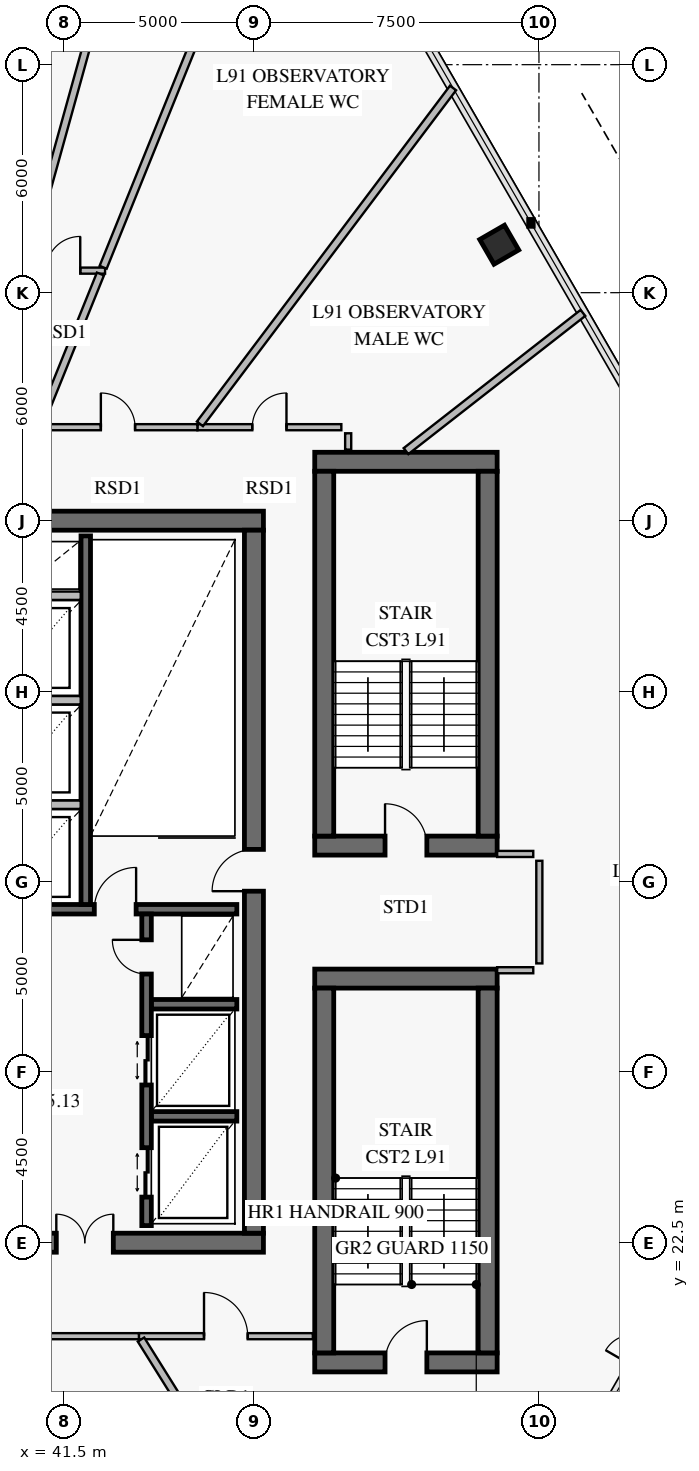
"""IFC4 building model, lengths in metres.
Left out: names, types, materials, properties, quantities, classifications, styles, units other than length and angle.
Written with IfcOpenShell. Run it as: python <this file> out.ifc"""

import sys

from ifc_helpers import new_model, si_unit, direction, frame, frame_2d, origin, origin_2d, place, context, subcontext, project, spatial, rectangle, extrude, element, fill, save


model = new_model("IFC4")
c1 = context("Model", 3, precision=1e-05, world=origin(), true_north=direction((0.0, 1.0)))
c2 = subcontext(c1, "Body", "Model", "MODEL_VIEW")
j1 = project(units=[si_unit("LENGTHUNIT", "METRE"), si_unit("PLANEANGLEUNIT", "RADIAN")], contexts=[c1])
p1 = place(None, origin())
s1 = spatial("IfcSite", under=j1, at=p1, CompositionType="ELEMENT")
p2 = place(p1, origin())
s2 = spatial("IfcBuilding", under=s1, at=p2, CompositionType="ELEMENT")
p3 = place(p2, frame((0.0, 0.0, 357.6)))
s3 = spatial("IfcBuildingStorey", under=s2, at=p3, CompositionType="ELEMENT", Elevation=357.6)
p4 = place(p3, frame((37.35, 22.5, 0.0), z_axis=(0.0, 0.0, 1.0), x_axis=(1.0, 0.0, 0.0)))
e1 = element("IfcWall", 1, at=p4, inside=s3, PredefinedType="SHEAR", context=c2, shape_type="SweptSolid", body=[
    extrude(rectangle(XDim=9.4, YDim=0.5, at=frame_2d((4.7, 0.0))), origin(), (0.0, 0.0, 1.0), 3.8),
])
p5 = place(p4, frame((3.95, 0.0, 0.0)))
e2 = element("IfcOpeningElement", 2, at=p5, cuts=e1, PredefinedType="OPENING", context=c2, shape_type="SweptSolid", body=[
    extrude(rectangle(XDim=1.5, YDim=2.15, at=frame_2d((0.75, 1.075))), frame((0.0, 0.262, 0.0), z_axis=(0.0, -1.0, 0.0), x_axis=(1.0, 0.0, 0.0)), (0.0, 0.0, 1.0), 0.524),
])
p6 = place(p3, frame((46.75, 41.5, 0.0), z_axis=(0.0, 0.0, 1.0), x_axis=(-1.0, 0.0, 0.0)))
e3 = element("IfcWall", 3, at=p6, inside=s3, PredefinedType="SHEAR", context=c2, shape_type="SweptSolid", body=[
    extrude(rectangle(XDim=7.8, YDim=0.5, at=frame_2d((3.9, 0.0))), origin(), (0.0, 0.0, 1.0), 3.8),
])
p7 = place(p3, frame((46.5, 22.75, 0.0), z_axis=(0.0, 0.0, 1.0), x_axis=(0.0, 1.0, 0.0)))
e4 = element("IfcWall", 4, at=p7, inside=s3, PredefinedType="SHEAR", context=c2, shape_type="SweptSolid", body=[
    extrude(rectangle(XDim=18.5, YDim=0.5, at=frame_2d((9.25, 0.0))), origin(), (0.0, 0.0, 1.0), 3.8),
])
p8 = place(p7, frame((9.0, 0.0, 0.0)))
e5 = element("IfcOpeningElement", 5, at=p8, cuts=e4, PredefinedType="OPENING", context=c2, shape_type="SweptSolid", body=[
    extrude(rectangle(XDim=1.1, YDim=2.15, at=frame_2d((0.55, 1.075))), frame((0.0, 0.262, 0.0), z_axis=(0.0, -1.0, 0.0), x_axis=(1.0, 0.0, 0.0)), (0.0, 0.0, 1.0), 0.524),
])
p9 = place(p3, frame((52.955, 48.762, 0.0), z_axis=(0.0, 0.0, 1.0), x_axis=(-0.5, 0.866025403784, 0.0)))
e6 = element("IfcColumn", 6, at=p9, inside=s3, PredefinedType="COLUMN", context=c2, shape_type="SweptSolid", body=[
    extrude(rectangle(XDim=0.75, YDim=0.75, at=origin_2d()), origin(), (0.0, 0.0, 1.0), 3.35),
])
p10 = place(p3, frame((48.1, 19.35, 0.0), z_axis=(0.0, 0.0, 1.0), x_axis=(1.0, 0.0, 0.0)))
e7 = element("IfcWall", 7, at=p10, inside=s3, PredefinedType="SHEAR", context=c2, shape_type="SweptSolid", body=[
    extrude(rectangle(XDim=4.8, YDim=0.5, at=frame_2d((2.4, 0.0))), origin(), (0.0, 0.0, 1.0), 3.8),
])
p11 = place(p10, frame((1.85, 0.0, 0.0)))
e8 = element("IfcOpeningElement", 8, at=p11, cuts=e7, PredefinedType="OPENING", context=c2, shape_type="SweptSolid", body=[
    extrude(rectangle(XDim=1.1, YDim=2.15, at=frame_2d((0.55, 1.075))), frame((0.0, 0.262, 0.0), z_axis=(0.0, -1.0, 0.0), x_axis=(1.0, 0.0, 0.0)), (0.0, 0.0, 1.0), 0.524),
])
p12 = place(p3, frame((52.9, 29.45, 0.0), z_axis=(0.0, 0.0, 1.0), x_axis=(-1.0, 0.0, 0.0)))
e9 = element("IfcWall", 9, at=p12, inside=s3, PredefinedType="SHEAR", context=c2, shape_type="SweptSolid", body=[
    extrude(rectangle(XDim=4.8, YDim=0.5, at=frame_2d((2.4, 0.0))), origin(), (0.0, 0.0, 1.0), 3.8),
])
for number, where, z_axis, x_axis in (
    (10, (48.35, 19.6, 0.0), (0.0, 0.0, 1.0), (0.0, 1.0, 0.0)),
    (11, (52.65, 29.2, 0.0), (0.0, 0.0, 1.0), (0.0, -1.0, 0.0)),
):
    element("IfcWall", number, at=place(p3, frame(where, z_axis=z_axis, x_axis=x_axis)), inside=s3, PredefinedType="SHEAR", context=c2, shape_type="SweptSolid", body=[
        extrude(rectangle(XDim=9.6, YDim=0.5, at=frame_2d((4.8, 0.0))), origin(), (0.0, 0.0, 1.0), 3.8),
    ])
p13 = place(p3, frame((48.1, 32.95, 0.0), z_axis=(0.0, 0.0, 1.0), x_axis=(1.0, 0.0, 0.0)))
e12 = element("IfcWall", 12, at=p13, inside=s3, PredefinedType="SHEAR", context=c2, shape_type="SweptSolid", body=[
    extrude(rectangle(XDim=4.8, YDim=0.5, at=frame_2d((2.4, 0.0))), origin(), (0.0, 0.0, 1.0), 3.8),
])
p14 = place(p13, frame((1.85, 0.0, 0.0)))
e13 = element("IfcOpeningElement", 13, at=p14, cuts=e12, PredefinedType="OPENING", context=c2, shape_type="SweptSolid", body=[
    extrude(rectangle(XDim=1.1, YDim=2.15, at=frame_2d((0.55, 1.075))), frame((0.0, 0.262, 0.0), z_axis=(0.0, -1.0, 0.0), x_axis=(1.0, 0.0, 0.0)), (0.0, 0.0, 1.0), 0.524),
])
p15 = place(p3, frame((52.9, 43.05, 0.0), z_axis=(0.0, 0.0, 1.0), x_axis=(-1.0, 0.0, 0.0)))
e14 = element("IfcWall", 14, at=p15, inside=s3, PredefinedType="SHEAR", context=c2, shape_type="SweptSolid", body=[
    extrude(rectangle(XDim=4.8, YDim=0.5, at=frame_2d((2.4, 0.0))), origin(), (0.0, 0.0, 1.0), 3.8),
])
for number, where, z_axis, x_axis in (
    (15, (48.35, 33.2, 0.0), (0.0, 0.0, 1.0), (0.0, 1.0, 0.0)),
    (16, (52.65, 42.8, 0.0), (0.0, 0.0, 1.0), (0.0, -1.0, 0.0)),
):
    element("IfcWall", number, at=place(p3, frame(where, z_axis=z_axis, x_axis=x_axis)), inside=s3, PredefinedType="SHEAR", context=c2, shape_type="SweptSolid", body=[
        extrude(rectangle(XDim=9.6, YDim=0.5, at=frame_2d((4.8, 0.0))), origin(), (0.0, 0.0, 1.0), 3.8),
    ])
p16 = place(p3, frame((25.95, 31.275, 0.0), z_axis=(0.0, 0.0, 1.0), x_axis=(1.0, 0.0, 0.0)))
e17 = element("IfcWall", 17, at=p16, inside=s3, PredefinedType="SOLIDWALL", context=c2, shape_type="SweptSolid", body=[
    extrude(rectangle(XDim=20.1, YDim=0.25, at=frame_2d((10.05, 0.0))), origin(), (0.0, 0.0, 1.0), 3.8),
])
p17 = place(p16, frame((2.6, 0.0, 0.0)))
e18 = element("IfcOpeningElement", 18, at=p17, cuts=e17, PredefinedType="OPENING", context=c2, shape_type="SweptSolid", body=[
    extrude(rectangle(XDim=1.1, YDim=2.15, at=frame_2d((0.55, 1.075))), frame((0.0, 0.137, 0.0), z_axis=(0.0, -1.0, 0.0), x_axis=(1.0, 0.0, 0.0)), (0.0, 0.0, 1.0), 0.274),
])
p18 = place(p16, frame((10.6, 0.0, 0.0)))
e19 = element("IfcOpeningElement", 19, at=p18, cuts=e17, PredefinedType="OPENING", context=c2, shape_type="SweptSolid", body=[
    extrude(rectangle(XDim=1.1, YDim=2.15, at=frame_2d((0.55, 1.075))), frame((0.0, 0.137, 0.0), z_axis=(0.0, -1.0, 0.0), x_axis=(1.0, 0.0, 0.0)), (0.0, 0.0, 1.0), 0.274),
])
p19 = place(p16, frame((16.35, 0.0, 0.0)))
e20 = element("IfcOpeningElement", 20, at=p19, cuts=e17, PredefinedType="OPENING", context=c2, shape_type="SweptSolid", body=[
    extrude(rectangle(XDim=1.1, YDim=2.15, at=frame_2d((0.55, 1.075))), frame((0.0, 0.137, 0.0), z_axis=(0.0, -1.0, 0.0), x_axis=(1.0, 0.0, 0.0)), (0.0, 0.0, 1.0), 0.274),
])
p20 = place(p3, frame((42.075, 31.4, 0.0), z_axis=(0.0, 0.0, 1.0), x_axis=(0.0, 1.0, 0.0)))
e21 = element("IfcWall", 21, at=p20, inside=s3, PredefinedType="SOLIDWALL", context=c2, shape_type="SweptSolid", body=[
    extrude(rectangle(XDim=9.7, YDim=0.25, at=frame_2d((4.85, 0.0))), origin(), (0.0, 0.0, 1.0), 3.8),
])
for number, where, z_axis, x_axis in (
    (22, (43.8, 25.825, 0.0), (0.0, 0.0, 1.0), (1.0, 0.0, 0.0)),
    (23, (43.8, 28.775, 0.0), (0.0, 0.0, 1.0), (1.0, 0.0, 0.0)),
):
    element("IfcWall", number, at=place(p3, frame(where, z_axis=z_axis, x_axis=x_axis)), inside=s3, PredefinedType="SOLIDWALL", context=c2, shape_type="SweptSolid", body=[
        extrude(rectangle(XDim=2.25, YDim=0.25, at=frame_2d((1.125, 0.0))), origin(), (0.0, 0.0, 1.0), 3.8),
    ])
p21 = place(p3, frame((43.675, 22.95, 0.0), z_axis=(0.0, 0.0, 1.0), x_axis=(0.0, 1.0, 0.0)))
e24 = element("IfcWall", 24, at=p21, inside=s3, PredefinedType="SOLIDWALL", context=c2, shape_type="SweptSolid", body=[
    extrude(rectangle(XDim=8.2, YDim=0.25, at=frame_2d((4.1, 0.0))), origin(), (0.0, 0.0, 1.0), 3.8),
])
p22 = place(p21, frame((0.75, 0.0, 0.0)))
e25 = element("IfcOpeningElement", 25, at=p22, cuts=e24, PredefinedType="OPENING", context=c2, shape_type="SweptSolid", body=[
    extrude(rectangle(XDim=1.3, YDim=2.3, at=frame_2d((0.65, 1.15))), frame((0.0, 0.137, 0.0), z_axis=(0.0, -1.0, 0.0), x_axis=(1.0, 0.0, 0.0)), (0.0, 0.0, 1.0), 0.274),
])
p23 = place(p21, frame((3.7, 0.0, 0.0)))
e26 = element("IfcOpeningElement", 26, at=p23, cuts=e24, PredefinedType="OPENING", context=c2, shape_type="SweptSolid", body=[
    extrude(rectangle(XDim=1.3, YDim=2.3, at=frame_2d((0.65, 1.15))), frame((0.0, 0.137, 0.0), z_axis=(0.0, -1.0, 0.0), x_axis=(1.0, 0.0, 0.0)), (0.0, 0.0, 1.0), 0.274),
])
p24 = place(p21, frame((6.62, 0.0, 0.0)))
e27 = element("IfcOpeningElement", 27, at=p24, cuts=e24, PredefinedType="OPENING", context=c2, shape_type="SweptSolid", body=[
    extrude(rectangle(XDim=0.9, YDim=2.1, at=frame_2d((0.45, 1.05))), frame((0.0, 0.137, 0.0), z_axis=(0.0, -1.0, 0.0), x_axis=(1.0, 0.0, 0.0)), (0.0, 0.0, 1.0), 0.274),
])
p25 = place(p3, frame((43.473, 20.04, 0.0), z_axis=(0.0, 0.0, 1.0), x_axis=(1.0, 0.0, 0.0)))
e28 = element("IfcWall", 28, at=p25, inside=s3, PredefinedType="PARTITIONING", context=c2, shape_type="SweptSolid", body=[
    extrude(rectangle(XDim=4.577, YDim=0.16, at=frame_2d((2.288, 0.0))), origin(), (0.0, 0.0, 1.0), 3.35),
])
p26 = place(p25, frame((1.713, 0.0, 0.0)))
e29 = element("IfcOpeningElement", 29, at=p26, cuts=e28, PredefinedType="OPENING", context=c2, shape_type="SweptSolid", body=[
    extrude(rectangle(XDim=1.15, YDim=2.2, at=frame_2d((0.575, 1.1))), frame((0.0, 0.092, 0.0), z_axis=(0.0, -1.0, 0.0), x_axis=(1.0, 0.0, 0.0)), (0.0, 0.0, 1.0), 0.184),
])
p27 = place(p3, frame((48.8, 43.96, 0.0), z_axis=(0.0, 0.0, 1.0), x_axis=(-1.0, 0.0, 0.0)))
e30 = element("IfcWall", 30, at=p27, inside=s3, PredefinedType="PARTITIONING", context=c2, shape_type="SweptSolid", body=[
    extrude(rectangle(XDim=3.788, YDim=0.16, at=frame_2d((1.894, 0.0))), origin(), (0.0, 0.0, 1.0), 3.35),
])
p28 = place(p27, frame((1.444, 0.0, 0.0)))
e31 = element("IfcOpeningElement", 31, at=p28, cuts=e30, PredefinedType="OPENING", context=c2, shape_type="SweptSolid", body=[
    extrude(rectangle(XDim=0.9, YDim=2.1, at=frame_2d((0.45, 1.05))), frame((0.0, 0.092, 0.0), z_axis=(0.0, -1.0, 0.0), x_axis=(1.0, 0.0, 0.0)), (0.0, 0.0, 1.0), 0.184),
])
p29 = place(p3, frame((45.012, 43.96, 0.0), z_axis=(0.0, 0.0, 1.0), x_axis=(-1.0, 0.0, 0.0)))
e32 = element("IfcWall", 32, at=p29, inside=s3, PredefinedType="PARTITIONING", context=c2, shape_type="SweptSolid", body=[
    extrude(rectangle(XDim=4.18, YDim=0.16, at=frame_2d((2.09, 0.0))), origin(), (0.0, 0.0, 1.0), 3.35),
])
p30 = place(p29, frame((1.64, 0.0, 0.0)))
e33 = element("IfcOpeningElement", 33, at=p30, cuts=e32, PredefinedType="OPENING", context=c2, shape_type="SweptSolid", body=[
    extrude(rectangle(XDim=0.9, YDim=2.1, at=frame_2d((0.45, 1.05))), frame((0.0, 0.092, 0.0), z_axis=(0.0, -1.0, 0.0), x_axis=(1.0, 0.0, 0.0)), (0.0, 0.0, 1.0), 0.184),
])
p31 = place(p3, frame((40.376, 48.08, 0.0), z_axis=(0.0, 0.0, 1.0), x_axis=(1.0, 0.0, 0.0)))
e34 = element("IfcWall", 34, at=p31, inside=s3, PredefinedType="PARTITIONING", context=c2, shape_type="SweptSolid", body=[
    extrude(rectangle(XDim=2.207, YDim=0.16, at=frame_2d((1.103, 0.0))), origin(), (0.0, 0.0, 1.0), 3.35),
])
p32 = place(p31, frame((0.653, 0.0, 0.0)))
e35 = element("IfcOpeningElement", 35, at=p32, cuts=e34, PredefinedType="OPENING", context=c2, shape_type="SweptSolid", body=[
    extrude(rectangle(XDim=0.9, YDim=2.1, at=frame_2d((0.45, 1.05))), frame((0.0, 0.092, 0.0), z_axis=(0.0, -1.0, 0.0), x_axis=(1.0, 0.0, 0.0)), (0.0, 0.0, 1.0), 0.184),
])
p33 = place(p3, frame((37.681, 20.04, 0.0), z_axis=(0.0, 0.0, 1.0), x_axis=(1.0, 0.0, 0.0)))
e36 = element("IfcWall", 36, at=p33, inside=s3, PredefinedType="PARTITIONING", context=c2, shape_type="SweptSolid", body=[
    extrude(rectangle(XDim=5.792, YDim=0.16, at=frame_2d((2.896, 0.0))), origin(), (0.0, 0.0, 1.0), 2.8),
])
p34 = place(p33, frame((2.421, 0.0, 0.0)))
e37 = element("IfcOpeningElement", 37, at=p34, cuts=e36, PredefinedType="OPENING", context=c2, shape_type="SweptSolid", body=[
    extrude(rectangle(XDim=0.95, YDim=2.1, at=frame_2d((0.475, 1.05))), frame((0.0, 0.092, 0.0), z_axis=(0.0, -1.0, 0.0), x_axis=(1.0, 0.0, 0.0)), (0.0, 0.0, 1.0), 0.184),
])
for number, where, z_axis, x_axis in (
    (38, (39.558, 34.025, 0.0), (0.0, 0.0, 1.0), (1.0, 0.0, 0.0)),
    (39, (39.558, 36.775, 0.0), (0.0, 0.0, 1.0), (1.0, 0.0, 0.0)),
    (40, (39.558, 39.525, 0.0), (0.0, 0.0, 1.0), (1.0, 0.0, 0.0)),
):
    element("IfcWall", number, at=place(p3, frame(where, z_axis=z_axis, x_axis=x_axis)), inside=s3, PredefinedType="PARTITIONING", context=c2, shape_type="SweptSolid", body=[
        extrude(rectangle(XDim=2.384, YDim=0.22, at=frame_2d((1.192, 0.0))), origin(), (0.0, 0.0, 1.0), 3.35),
    ])
p35 = place(p3, frame((43.528, 19.952, 0.0), z_axis=(0.0, 0.0, 1.0), x_axis=(0.529929518021, -0.848041688793, 0.0)))
e41 = element("IfcWall", 41, at=p35, inside=s3, PredefinedType="PARTITIONING", context=c2, shape_type="SweptSolid", body=[
    extrude(rectangle(XDim=12.961, YDim=0.2, at=frame_2d((6.48, 0.0))), origin(), (0.0, 0.0, 1.0), 2.77),
])
p36 = place(p3, frame((54.01, 29.85, 0.0), z_axis=(0.0, 0.0, 1.0), x_axis=(0.0, 1.0, 0.0)))
e42 = element("IfcWall", 42, at=p36, inside=s3, PredefinedType="PARTITIONING", context=c2, shape_type="SweptSolid", body=[
    extrude(rectangle(XDim=2.7, YDim=0.16, at=frame_2d((1.35, 0.0))), origin(), (0.0, 0.0, 1.0), 3.35),
])
p37 = place(p3, frame((50.502, 43.33, 0.0), z_axis=(0.0, 0.0, 1.0), x_axis=(0.788021867537, 0.615647249879, 0.0)))
e43 = element("IfcWall", 43, at=p37, inside=s3, PredefinedType="PARTITIONING", context=c2, shape_type="SweptSolid", body=[
    extrude(rectangle(XDim=5.907, YDim=0.2, at=frame_2d((2.954, 0.0))), origin(), (0.0, 0.0, 1.0), 2.77),
])
p38 = place(p3, frame((45.079, 44.048, 0.0), z_axis=(0.0, 0.0, 1.0), x_axis=(0.601830257004, 0.798624030288, 0.0)))
e44 = element("IfcWall", 44, at=p38, inside=s3, PredefinedType="PARTITIONING", context=c2, shape_type="SweptSolid", body=[
    extrude(rectangle(XDim=11.067, YDim=0.2, at=frame_2d((5.534, 0.0))), origin(), (0.0, 0.0, 1.0), 2.77),
])
p39 = place(p3, frame((40.868, 44.048, 0.0), z_axis=(0.0, 0.0, 1.0), x_axis=(0.374624373524, 0.927176670738, 0.0)))
e45 = element("IfcWall", 45, at=p39, inside=s3, PredefinedType="PARTITIONING", context=c2, shape_type="SweptSolid", body=[
    extrude(rectangle(XDim=4.254, YDim=0.2, at=frame_2d((2.127, 0.0))), origin(), (0.0, 0.0, 1.0), 3.35),
])
p40 = place(p3, frame((42.532, 48.168, 0.0), z_axis=(0.0, 0.0, 1.0), x_axis=(0.374606955292, 0.927183708359, 0.0)))
e46 = element("IfcWall", 46, at=p40, inside=s3, PredefinedType="PARTITIONING", context=c2, shape_type="SweptSolid", body=[
    extrude(rectangle(XDim=8.527, YDim=0.2, at=frame_2d((4.264, 0.0))), origin(), (0.0, 0.0, 1.0), 2.77),
])
p41 = place(p3, frame((40.484, 48.168, 0.0), z_axis=(0.0, 0.0, 1.0), x_axis=(0.267208963636, 0.963638609517, 0.0)))
e47 = element("IfcWall", 47, at=p41, inside=s3, PredefinedType="PARTITIONING", context=c2, shape_type="SweptSolid", body=[
    extrude(rectangle(XDim=6.747, YDim=0.2, at=frame_2d((3.373, 0.0))), origin(), (0.0, 0.0, 1.0), 2.8),
])
for number, where, z_axis, x_axis in (
    (48, (52.9, 29.67, 0.0), (0.0, 0.0, 1.0), (1.0, 0.0, 0.0)),
    (49, (53.85, 32.73, 0.0), (0.0, 0.0, 1.0), (-1.0, 0.0, 0.0)),
):
    element("IfcWall", number, at=place(p3, frame(where, z_axis=z_axis, x_axis=x_axis)), inside=s3, PredefinedType="PARTITIONING", context=c2, shape_type="SweptSolid", body=[
        extrude(rectangle(XDim=0.95, YDim=0.16, at=frame_2d((0.475, 0.0))), origin(), (0.0, 0.0, 1.0), 3.35),
    ])
p42 = place(p3, frame((48.98, 43.37, 0.0), z_axis=(0.0, 0.0, 1.0), x_axis=(0.0, 1.0, 0.0)))
e50 = element("IfcWall", 50, at=p42, inside=s3, PredefinedType="PARTITIONING", context=c2, shape_type="SweptSolid", body=[
    extrude(rectangle(XDim=0.43, YDim=0.16, at=frame_2d((0.215, 0.0))), origin(), (0.0, 0.0, 1.0), 3.35),
])
p43 = place(p8, origin())
e51 = element("IfcDoor", 51, at=p43, inside=s3, OperationType="SINGLE_SWING_LEFT", PredefinedType="USERDEFINED", context=c2, shape_type="SweptSolid", body=[
    extrude(rectangle(XDim=1.1, YDim=2.15, at=frame_2d((0.55, 1.075))), frame((0.0, 0.025, 0.0), z_axis=(0.0, -1.0, 0.0), x_axis=(1.0, 0.0, 0.0)), (0.0, 0.0, 1.0), 0.05),
])
fill(e5, e51)
p44 = place(p5, origin())
e52 = element("IfcDoor", 52, at=p44, inside=s3, OperationType="DOUBLE_DOOR_SINGLE_SWING", PredefinedType="DOOR", context=c2, shape_type="SweptSolid", body=[
    extrude(rectangle(XDim=1.5, YDim=2.15, at=frame_2d((0.75, 1.075))), frame((0.0, 0.025, 0.0), z_axis=(0.0, -1.0, 0.0), x_axis=(1.0, 0.0, 0.0)), (0.0, 0.0, 1.0), 0.05),
])
fill(e2, e52)
p45 = place(p11, origin())
e53 = element("IfcDoor", 53, at=p45, inside=s3, OperationType="SINGLE_SWING_RIGHT", PredefinedType="USERDEFINED", context=c2, shape_type="SweptSolid", body=[
    extrude(rectangle(XDim=1.1, YDim=2.15, at=frame_2d((0.55, 1.075))), frame((0.0, 0.025, 0.0), z_axis=(0.0, -1.0, 0.0), x_axis=(1.0, 0.0, 0.0)), (0.0, 0.0, 1.0), 0.05),
])
fill(e8, e53)
p46 = place(p14, origin())
e54 = element("IfcDoor", 54, at=p46, inside=s3, OperationType="SINGLE_SWING_LEFT", PredefinedType="USERDEFINED", context=c2, shape_type="SweptSolid", body=[
    extrude(rectangle(XDim=1.1, YDim=2.15, at=frame_2d((0.55, 1.075))), frame((0.0, 0.025, 0.0), z_axis=(0.0, -1.0, 0.0), x_axis=(1.0, 0.0, 0.0)), (0.0, 0.0, 1.0), 0.05),
])
fill(e13, e54)
p47 = place(p19, origin())
e55 = element("IfcDoor", 55, at=p47, inside=s3, OperationType="SINGLE_SWING_RIGHT", PredefinedType="USERDEFINED", context=c2, shape_type="SweptSolid", body=[
    extrude(rectangle(XDim=1.1, YDim=2.15, at=frame_2d((0.55, 1.075))), frame((0.0, 0.025, 0.0), z_axis=(0.0, -1.0, 0.0), x_axis=(1.0, 0.0, 0.0)), (0.0, 0.0, 1.0), 0.05),
])
fill(e20, e55)
p48 = place(p22, origin())
e56 = element("IfcDoor", 56, at=p48, inside=s3, OperationType="DOUBLE_DOOR_SLIDING", PredefinedType="DOOR", context=c2, shape_type="SweptSolid", body=[
    extrude(rectangle(XDim=1.3, YDim=2.3, at=frame_2d((0.65, 1.15))), frame((0.0, 0.025, 0.0), z_axis=(0.0, -1.0, 0.0), x_axis=(1.0, 0.0, 0.0)), (0.0, 0.0, 1.0), 0.05),
])
fill(e25, e56)
p49 = place(p23, origin())
e57 = element("IfcDoor", 57, at=p49, inside=s3, OperationType="DOUBLE_DOOR_SLIDING", PredefinedType="DOOR", context=c2, shape_type="SweptSolid", body=[
    extrude(rectangle(XDim=1.3, YDim=2.3, at=frame_2d((0.65, 1.15))), frame((0.0, 0.025, 0.0), z_axis=(0.0, -1.0, 0.0), x_axis=(1.0, 0.0, 0.0)), (0.0, 0.0, 1.0), 0.05),
])
fill(e26, e57)
p50 = place(p24, origin())
e58 = element("IfcDoor", 58, at=p50, inside=s3, OperationType="SINGLE_SWING_RIGHT", PredefinedType="DOOR", context=c2, shape_type="SweptSolid", body=[
    extrude(rectangle(XDim=0.9, YDim=2.1, at=frame_2d((0.45, 1.05))), frame((0.0, 0.025, 0.0), z_axis=(0.0, -1.0, 0.0), x_axis=(1.0, 0.0, 0.0)), (0.0, 0.0, 1.0), 0.05),
])
fill(e27, e58)
p51 = place(p26, origin())
e59 = element("IfcDoor", 59, at=p51, inside=s3, OperationType="SINGLE_SWING_LEFT", PredefinedType="DOOR", context=c2, shape_type="SweptSolid", body=[
    extrude(rectangle(XDim=1.15, YDim=2.2, at=frame_2d((0.575, 1.1))), frame((0.0, 0.025, 0.0), z_axis=(0.0, -1.0, 0.0), x_axis=(1.0, 0.0, 0.0)), (0.0, 0.0, 1.0), 0.05),
])
fill(e29, e59)
p52 = place(p28, frame((0.9, 0.0, 0.0), z_axis=(0.0, 0.0, 1.0), x_axis=(-1.0, 0.0, 0.0)))
e60 = element("IfcDoor", 60, at=p52, inside=s3, OperationType="SINGLE_SWING_RIGHT", PredefinedType="DOOR", context=c2, shape_type="SweptSolid", body=[
    extrude(rectangle(XDim=0.9, YDim=2.1, at=frame_2d((0.45, 1.05))), frame((0.0, 0.025, 0.0), z_axis=(0.0, -1.0, 0.0), x_axis=(1.0, 0.0, 0.0)), (0.0, 0.0, 1.0), 0.05),
])
fill(e31, e60)
p53 = place(p30, frame((0.9, 0.0, 0.0), z_axis=(0.0, 0.0, 1.0), x_axis=(-1.0, 0.0, 0.0)))
e61 = element("IfcDoor", 61, at=p53, inside=s3, OperationType="SINGLE_SWING_LEFT", PredefinedType="DOOR", context=c2, shape_type="SweptSolid", body=[
    extrude(rectangle(XDim=0.9, YDim=2.1, at=frame_2d((0.45, 1.05))), frame((0.0, 0.025, 0.0), z_axis=(0.0, -1.0, 0.0), x_axis=(1.0, 0.0, 0.0)), (0.0, 0.0, 1.0), 0.05),
])
fill(e33, e61)
p54 = place(p32, origin())
e62 = element("IfcDoor", 62, at=p54, inside=s3, OperationType="SINGLE_SWING_RIGHT", PredefinedType="DOOR", context=c2, shape_type="SweptSolid", body=[
    extrude(rectangle(XDim=0.9, YDim=2.1, at=frame_2d((0.45, 1.05))), frame((0.0, 0.025, 0.0), z_axis=(0.0, -1.0, 0.0), x_axis=(1.0, 0.0, 0.0)), (0.0, 0.0, 1.0), 0.05),
])
fill(e35, e62)
save(model, sys.argv[1])
